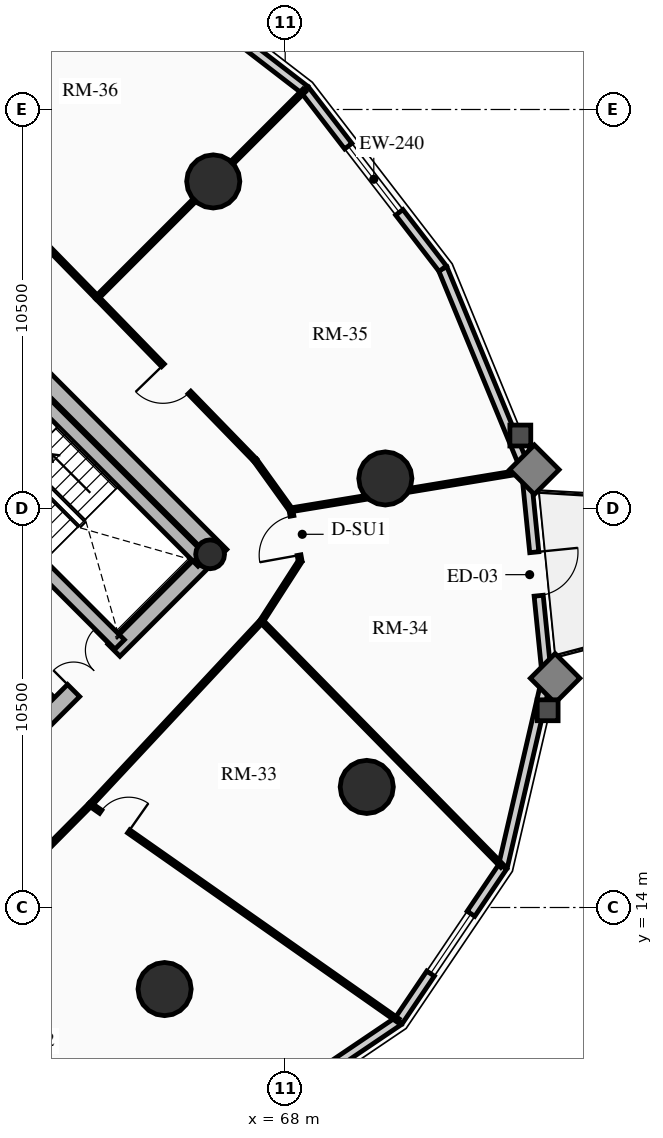
"""IFC4 building model, lengths in metres.
Left out: names, types, materials, properties, quantities, classifications, styles, units other than length and angle.
Written with IfcOpenShell. Run it as: python <this file> out.ifc"""

import sys

from ifc_helpers import new_model, si_unit, direction, frame, frame_2d, origin, origin_2d, place, context, subcontext, project, spatial, rectangle, circle, hollow_circle, extrude, source, transform, mapped, element, fill, save


model = new_model("IFC4")
c1 = context("Model", 3, precision=1e-05, world=origin(), true_north=direction((0.0, 1.0)))
c2 = subcontext(c1, "Body", "Model", "MODEL_VIEW")
j1 = project(units=[si_unit("LENGTHUNIT", "METRE"), si_unit("PLANEANGLEUNIT", "RADIAN")], contexts=[c1])
p1 = place(None, origin())
s1 = spatial("IfcSite", under=j1, at=p1, CompositionType="ELEMENT")
p2 = place(p1, origin())
s2 = spatial("IfcBuilding", under=s1, at=p2, CompositionType="ELEMENT")
p3 = place(p2, frame((0.0, 0.0, 102.16)))
s3 = spatial("IfcBuildingStorey", under=s2, at=p3, CompositionType="ELEMENT", Elevation=102.16)
p4 = place(p3, frame((66.303, 23.263, 0.0), z_axis=(0.0, 0.0, 1.0), x_axis=(-0.707106781187, 0.707106781187, 0.0)))
e1 = element("IfcWall", 1, at=p4, inside=s3, PredefinedType="SHEAR", context=c2, shape_type="SweptSolid", body=[
    extrude(rectangle(XDim=14.2, YDim=0.45, at=frame_2d((7.1, 0.0))), origin(), (0.0, 0.0, 1.0), 2.91),
])
p5 = place(p3, frame((58.578, 15.856, 0.0), z_axis=(0.0, 0.0, 1.0), x_axis=(0.707106781187, 0.707106781187, 0.0)))
e2 = element("IfcWall", 2, at=p5, inside=s3, PredefinedType="SHEAR", context=c2, shape_type="SweptSolid", body=[
    extrude(rectangle(XDim=10.7, YDim=0.45, at=frame_2d((5.35, 0.0))), origin(), (0.0, 0.0, 1.0), 2.91),
])
m1 = source(origin(), c2, "Body", "SweptSolid", [
    extrude(rectangle(XDim=1.5, YDim=2.02, at=frame_2d((0.75, 1.01))), frame((0.0, 0.235, 0.0), z_axis=(0.0, -1.0, 0.0), x_axis=(1.0, 0.0, 0.0)), (0.0, 0.0, 1.0), 0.47),
])
p6 = place(p5, frame((5.45, 0.0, 0.0)))
e3 = element("IfcOpeningElement", 3, at=p6, cuts=e2, PredefinedType="OPENING", context=c2, shape_type="MappedRepresentation", body=[
    mapped(m1, transform((0.0, 0.0, 0.0), x_axis=(1.0, 0.0, 0.0), y_axis=(0.0, 1.0, 0.0), z_axis=(0.0, 0.0, 1.0), scale=1.0)),
])
p7 = place(p3, frame((63.645, 20.922, 0.0), z_axis=(0.0, 0.0, 1.0), x_axis=(-0.707106781187, 0.707106781187, 0.0)))
e4 = element("IfcWall", 4, at=p7, inside=s3, PredefinedType="SHEAR", context=c2, shape_type="SweptSolid", body=[
    extrude(rectangle(XDim=13.75, YDim=0.35, at=frame_2d((6.875, 0.0))), origin(), (0.0, 0.0, 1.0), 2.91),
])
m2 = source(origin(), c2, "Body", "SweptSolid", [
    extrude(rectangle(XDim=1.1, YDim=2.015, at=frame_2d((0.55, 1.007))), frame((0.0, 0.185, 0.0), z_axis=(0.0, -1.0, 0.0), x_axis=(1.0, 0.0, 0.0)), (0.0, 0.0, 1.0), 0.37),
])
p8 = place(p7, frame((10.0, 0.0, 0.0)))
e5 = element("IfcOpeningElement", 5, at=p8, cuts=e4, PredefinedType="OPENING", context=c2, shape_type="MappedRepresentation", body=[
    mapped(m2, transform((0.0, 0.0, 0.0), x_axis=(1.0, 0.0, 0.0), y_axis=(0.0, 1.0, 0.0), z_axis=(0.0, 0.0, 1.0), scale=1.0)),
])
p9 = place(p7, frame((12.0, 0.0, 0.0)))
e6 = element("IfcOpeningElement", 6, at=p9, cuts=e4, PredefinedType="OPENING", context=c2, shape_type="MappedRepresentation", body=[
    mapped(m2, transform((0.0, 0.0, 0.0), x_axis=(1.0, 0.0, 0.0), y_axis=(0.0, 1.0, 0.0), z_axis=(0.0, 0.0, 1.0), scale=1.0)),
])
m3 = source(origin(), c2, "Body", "SweptSolid", [
    extrude(rectangle(XDim=1.15, YDim=2.02, at=frame_2d((0.575, 1.01))), frame((0.0, 0.185, 0.0), z_axis=(0.0, -1.0, 0.0), x_axis=(1.0, 0.0, 0.0)), (0.0, 0.0, 1.0), 0.37),
])
p10 = place(p7, frame((5.305, 0.0, 0.0)))
e7 = element("IfcOpeningElement", 7, at=p10, cuts=e4, PredefinedType="OPENING", context=c2, shape_type="MappedRepresentation", body=[
    mapped(m3, transform((0.0, 0.0, 0.0), x_axis=(1.0, 0.0, 0.0), y_axis=(0.0, 1.0, 0.0), z_axis=(0.0, 0.0, 1.0), scale=1.0)),
])
p11 = place(p3, frame((65.83, 23.107, 0.0), z_axis=(0.0, 0.0, 1.0), x_axis=(-0.707088616009, 0.707124945897, 0.0)))
e8 = element("IfcWall", 8, at=p11, inside=s3, PredefinedType="SHEAR", context=c2, shape_type="SweptSolid", body=[
    extrude(rectangle(XDim=6.72, YDim=0.35, at=frame_2d((3.36, 0.0))), origin(), (0.0, 0.0, 1.0), 2.91),
])
p12 = place(p3, frame((66.024, 23.294, 0.0), z_axis=(0.0, 0.0, 1.0), x_axis=(0.707106781187, 0.707106781187, 0.0)))
e9 = element("IfcColumn", 9, at=p12, inside=s3, PredefinedType="COLUMN", context=c2, shape_type="SweptSolid", body=[
    extrude(hollow_circle(Radius=0.38, WallThickness=0.032, at=origin_2d()), origin(), (0.0, 0.0, 1.0), 2.91),
])
for number, where, z_axis, x_axis in (
    (10, (66.107, 33.107, 0.0), (0.0, 0.0, 1.0), (1.0, 0.0, 0.0)),
    (11, (64.827, 11.854, 0.0), (0.0, 0.0, 1.0), (1.0, 0.0, 0.0)),
    (12, (70.146, 17.173, 0.0), (0.0, 0.0, 1.0), (1.0, 0.0, 0.0)),
    (13, (70.635, 25.291, 0.0), (0.0, 0.0, 1.0), (1.0, 0.0, 0.0)),
):
    element("IfcColumn", number, at=place(p3, frame(where, z_axis=z_axis, x_axis=x_axis)), inside=s3, PredefinedType="USERDEFINED", context=c2, shape_type="SweptSolid", body=[
        extrude(circle(Radius=0.7, at=origin_2d()), origin(), (0.0, 0.0, 1.0), 2.91),
    ])
p13 = place(p3, frame((63.811, 39.145, 0.0), z_axis=(0.0, 0.0, 1.0), x_axis=(0.791982052206, -0.61054437102, 0.0)))
e14 = element("IfcWall", 14, at=p13, inside=s3, PredefinedType="SOLIDWALL", context=c2, shape_type="SweptSolid", body=[
    extrude(rectangle(XDim=5.942, YDim=0.24, at=frame_2d((2.971, 0.0))), origin(), (0.0, 0.0, 1.0), 2.179),
])
p14 = place(p3, frame((70.985, 11.015, 0.0), z_axis=(0.0, 0.0, 1.0), x_axis=(-0.828781148131, -0.559572880421, 0.0)))
e15 = element("IfcWall", 15, at=p14, inside=s3, PredefinedType="SOLIDWALL", context=c2, shape_type="SweptSolid", body=[
    extrude(rectangle(XDim=4.905, YDim=0.24, at=frame_2d((2.452, 0.0))), origin(), (0.0, 0.0, 1.0), 2.179),
])
p15 = place(p3, frame((73.729, 15.08, 0.0), z_axis=(0.0, 0.0, 1.0), x_axis=(-0.559572880421, -0.828781148131, 0.0)))
e16 = element("IfcWall", 16, at=p15, inside=s3, PredefinedType="SOLIDWALL", context=c2, shape_type="SweptSolid", body=[
    extrude(rectangle(XDim=4.905, YDim=0.24, at=frame_2d((2.452, 0.0))), origin(), (0.0, 0.0, 1.0), 2.179),
])
m4 = source(origin(), c2, "Body", "SweptSolid", [
    extrude(rectangle(XDim=1.9, YDim=1.35, at=frame_2d((0.95, 0.675))), frame((0.0, 0.13, 0.0), z_axis=(0.0, -1.0, 0.0), x_axis=(1.0, 0.0, 0.0)), (0.0, 0.0, 1.0), 0.26),
])
p16 = place(p15, frame((1.502, 0.0, 0.65)))
e17 = element("IfcOpeningElement", 17, at=p16, cuts=e16, PredefinedType="OPENING", context=c2, shape_type="MappedRepresentation", body=[
    mapped(m4, transform((0.0, 0.0, 0.0), x_axis=(1.0, 0.0, 0.0), y_axis=(0.0, 1.0, 0.0), z_axis=(0.0, 0.0, 1.0), scale=1.0)),
])
p17 = place(p3, frame((74.885, 20.067, 0.0), z_axis=(0.0, 0.0, 1.0), x_axis=(-0.225834725257, -0.974165631126, 0.0)))
e18 = element("IfcWall", 18, at=p17, inside=s3, PredefinedType="SOLIDWALL", context=c2, shape_type="SweptSolid", body=[
    extrude(rectangle(XDim=5.119, YDim=0.24, at=frame_2d((2.56, 0.0))), origin(), (0.0, 0.0, 1.0), 2.179),
])
p18 = place(p3, frame((74.339, 25.487, 0.0), z_axis=(0.0, 0.0, 1.0), x_axis=(0.10015591906, -0.994971754311, 0.0)))
e19 = element("IfcWall", 19, at=p18, inside=s3, PredefinedType="SOLIDWALL", context=c2, shape_type="SweptSolid", body=[
    extrude(rectangle(XDim=5.448, YDim=0.24, at=frame_2d((2.724, 0.0))), origin(), (0.0, 0.0, 1.0), 2.179),
])
m5 = source(origin(), c2, "Body", "SweptSolid", [
    extrude(rectangle(XDim=1.15, YDim=2.005, at=frame_2d((0.575, 1.002))), frame((0.0, 0.13, 0.0), z_axis=(0.0, -1.0, 0.0), x_axis=(1.0, 0.0, 0.0)), (0.0, 0.0, 1.0), 0.26),
])
p19 = place(p18, frame((2.149, 0.0, 0.0)))
e20 = element("IfcOpeningElement", 20, at=p19, cuts=e19, PredefinedType="OPENING", context=c2, shape_type="MappedRepresentation", body=[
    mapped(m5, transform((0.0, 0.0, 0.0), x_axis=(1.0, 0.0, 0.0), y_axis=(0.0, 1.0, 0.0), z_axis=(0.0, 0.0, 1.0), scale=1.0)),
])
p20 = place(p3, frame((72.145, 30.811, 0.0), z_axis=(0.0, 0.0, 1.0), x_axis=(0.381027003055, -0.924563909604, 0.0)))
e21 = element("IfcWall", 21, at=p20, inside=s3, PredefinedType="SOLIDWALL", context=c2, shape_type="SweptSolid", body=[
    extrude(rectangle(XDim=5.758, YDim=0.24, at=frame_2d((2.879, 0.0))), origin(), (0.0, 0.0, 1.0), 2.179),
])
p21 = place(p3, frame((68.517, 35.517, 0.0), z_axis=(0.0, 0.0, 1.0), x_axis=(0.61054437102, -0.791982052206, 0.0)))
e22 = element("IfcWall", 22, at=p21, inside=s3, PredefinedType="SOLIDWALL", context=c2, shape_type="SweptSolid", body=[
    extrude(rectangle(XDim=5.942, YDim=0.24, at=frame_2d((2.971, 0.0))), origin(), (0.0, 0.0, 1.0), 2.179),
])
m6 = source(origin(), c2, "Body", "SweptSolid", [
    extrude(rectangle(XDim=2.2, YDim=1.35, at=frame_2d((1.1, 0.675))), frame((0.0, 0.13, 0.0), z_axis=(0.0, -1.0, 0.0), x_axis=(1.0, 0.0, 0.0)), (0.0, 0.0, 1.0), 0.26),
])
p22 = place(p21, frame((1.871, 0.0, 0.65)))
e23 = element("IfcOpeningElement", 23, at=p22, cuts=e22, PredefinedType="OPENING", context=c2, shape_type="MappedRepresentation", body=[
    mapped(m6, transform((0.0, 0.0, 0.0), x_axis=(1.0, 0.0, 0.0), y_axis=(0.0, 1.0, 0.0), z_axis=(0.0, 0.0, 1.0), scale=1.0)),
])
p23 = place(p3, frame((61.835, 19.529, 0.0), z_axis=(0.0, 0.0, 1.0), x_axis=(-0.707146413884, 0.707067146267, 0.0)))
e24 = element("IfcWall", 24, at=p23, inside=s3, PredefinedType="PARTITIONING", context=c2, shape_type="SweptSolid", body=[
    extrude(rectangle(XDim=3.08, YDim=0.125, at=frame_2d((1.54, 0.0))), origin(), (0.0, 0.0, 1.0), 2.655),
])
m7 = source(origin(), c2, "Body", "SweptSolid", [
    extrude(rectangle(XDim=0.9, YDim=2.005, at=frame_2d((0.45, 1.002))), frame((0.0, 0.073, 0.0), z_axis=(0.0, -1.0, 0.0), x_axis=(1.0, 0.0, 0.0)), (0.0, 0.0, 1.0), 0.145),
])
p24 = place(p23, frame((1.05, 0.0, 0.0)))
e25 = element("IfcOpeningElement", 25, at=p24, cuts=e24, PredefinedType="OPENING", context=c2, shape_type="MappedRepresentation", body=[
    mapped(m7, transform((0.0, 0.0, 0.0), x_axis=(1.0, 0.0, 0.0), y_axis=(0.0, 1.0, 0.0), z_axis=(0.0, 0.0, 1.0), scale=1.0)),
])
p25 = place(p3, frame((63.051, 30.051, 0.0), z_axis=(0.0, 0.0, 1.0), x_axis=(-0.698911483116, 0.715208178622, 0.0)))
e26 = element("IfcWall", 26, at=p25, inside=s3, PredefinedType="MOVABLE", context=c2, shape_type="SweptSolid", body=[
    extrude(rectangle(XDim=6.082, YDim=0.1, at=frame_2d((3.041, 0.0))), origin(), (0.0, 0.0, 1.0), 2.225),
])
p26 = place(p3, frame((60.549, 14.366, 0.0), z_axis=(0.0, 0.0, 1.0), x_axis=(0.704402344516, 0.709800913666, 0.0)))
e27 = element("IfcWall", 27, at=p26, inside=s3, PredefinedType="MOVABLE", context=c2, shape_type="SweptSolid", body=[
    extrude(rectangle(XDim=3.301, YDim=0.1, at=frame_2d((1.651, 0.0))), origin(), (0.0, 0.0, 1.0), 2.225),
])
p27 = place(p3, frame((62.875, 16.709, 0.0), z_axis=(0.0, 0.0, 1.0), x_axis=(0.682290572861, 0.731081099595, 0.0)))
e28 = element("IfcWall", 28, at=p27, inside=s3, PredefinedType="MOVABLE", context=c2, shape_type="SweptSolid", body=[
    extrude(rectangle(XDim=6.6, YDim=0.1, at=frame_2d((3.3, 0.0))), origin(), (0.0, 0.0, 1.0), 2.225),
])
p28 = place(p3, frame((67.378, 21.534, 0.0), z_axis=(0.0, 0.0, 1.0), x_axis=(0.54130306552, 0.840827563332, 0.0)))
e29 = element("IfcWall", 29, at=p28, inside=s3, PredefinedType="MOVABLE", context=c2, shape_type="SweptSolid", body=[
    extrude(rectangle(XDim=1.877, YDim=0.1, at=frame_2d((0.938, 0.0))), origin(), (0.0, 0.0, 1.0), 2.225),
])
p29 = place(p3, frame((68.394, 23.113, 0.0), z_axis=(0.0, 0.0, 1.0), x_axis=(-0.177868948753, 0.984054184011, 0.0)))
e30 = element("IfcWall", 30, at=p29, inside=s3, PredefinedType="MOVABLE", context=c2, shape_type="SweptSolid", body=[
    extrude(rectangle(XDim=1.374, YDim=0.1, at=frame_2d((0.687, 0.0))), origin(), (0.0, 0.0, 1.0), 2.225),
])
m8 = source(origin(), c2, "Body", "SweptSolid", [
    extrude(rectangle(XDim=1.05, YDim=2.015, at=frame_2d((0.525, 1.007))), frame((0.0, 0.06, 0.0), z_axis=(0.0, -1.0, 0.0), x_axis=(1.0, 0.0, 0.0)), (0.0, 0.0, 1.0), 0.12),
])
p30 = place(p29, frame((0.162, 0.0, 0.0)))
e31 = element("IfcOpeningElement", 31, at=p30, cuts=e30, PredefinedType="OPENING", context=c2, shape_type="MappedRepresentation", body=[
    mapped(m8, transform((0.0, 0.0, 0.0), x_axis=(1.0, 0.0, 0.0), y_axis=(0.0, 1.0, 0.0), z_axis=(0.0, 0.0, 1.0), scale=1.0)),
])
p31 = place(p3, frame((68.15, 24.465, 0.0), z_axis=(0.0, 0.0, 1.0), x_axis=(-0.58376767291, 0.811920749868, 0.0)))
e32 = element("IfcWall", 32, at=p31, inside=s3, PredefinedType="MOVABLE", context=c2, shape_type="SweptSolid", body=[
    extrude(rectangle(XDim=1.605, YDim=0.1, at=frame_2d((0.803, 0.0))), origin(), (0.0, 0.0, 1.0), 2.225),
])
p32 = place(p3, frame((67.213, 25.768, 0.0), z_axis=(0.0, 0.0, 1.0), x_axis=(-0.696916079748, 0.717152687918, 0.0)))
e33 = element("IfcWall", 33, at=p32, inside=s3, PredefinedType="MOVABLE", context=c2, shape_type="SweptSolid", body=[
    extrude(rectangle(XDim=5.972, YDim=0.1, at=frame_2d((2.986, 0.0))), origin(), (0.0, 0.0, 1.0), 2.655),
])
m9 = source(origin(), c2, "Body", "SweptSolid", [
    extrude(rectangle(XDim=1.0, YDim=2.015, at=frame_2d((0.5, 1.007))), frame((0.0, 0.06, 0.0), z_axis=(0.0, -1.0, 0.0), x_axis=(1.0, 0.0, 0.0)), (0.0, 0.0, 1.0), 0.12),
])
p33 = place(p32, frame((2.486, 0.0, 0.0)))
e34 = element("IfcOpeningElement", 34, at=p33, cuts=e33, PredefinedType="OPENING", context=c2, shape_type="MappedRepresentation", body=[
    mapped(m9, transform((0.0, 0.0, 0.0), x_axis=(1.0, 0.0, 0.0), y_axis=(0.0, 1.0, 0.0), z_axis=(0.0, 0.0, 1.0), scale=1.0)),
])
p34 = place(p3, frame((63.051, 30.051, 0.0), z_axis=(0.0, 0.0, 1.0), x_axis=(0.707106781187, 0.707106781187, 0.0)))
e35 = element("IfcWall", 35, at=p34, inside=s3, PredefinedType="MOVABLE", context=c2, shape_type="SweptSolid", body=[
    extrude(rectangle(XDim=7.711, YDim=0.1, at=frame_2d((3.855, 0.0))), origin(), (0.0, 0.0, 1.0), 2.179),
])
p35 = place(p3, frame((67.378, 21.534, 0.0), z_axis=(0.0, 0.0, 1.0), x_axis=(0.700878918497, -0.713280268622, 0.0)))
e36 = element("IfcWall", 36, at=p35, inside=s3, PredefinedType="MOVABLE", context=c2, shape_type="SweptSolid", body=[
    extrude(rectangle(XDim=9.036, YDim=0.1, at=frame_2d((4.518, 0.0))), origin(), (0.0, 0.0, 1.0), 2.179),
])
p36 = place(p3, frame((68.15, 24.465, 0.0), z_axis=(0.0, 0.0, 1.0), x_axis=(0.986627164528, 0.162993368625, 0.0)))
e37 = element("IfcWall", 37, at=p36, inside=s3, PredefinedType="MOVABLE", context=c2, shape_type="SweptSolid", body=[
    extrude(rectangle(XDim=6.254, YDim=0.1, at=frame_2d((3.127, 0.0))), origin(), (0.0, 0.0, 1.0), 2.179),
])
p37 = place(p3, frame((62.875, 16.709, 0.0), z_axis=(0.0, 0.0, 1.0), x_axis=(0.818628370173, -0.574323594804, 0.0)))
e38 = element("IfcWall", 38, at=p37, inside=s3, PredefinedType="MOVABLE", context=c2, shape_type="SweptSolid", body=[
    extrude(rectangle(XDim=9.889, YDim=0.1, at=frame_2d((4.945, 0.0))), origin(), (0.0, 0.0, 1.0), 2.179),
])
m10 = source(origin(), c2, "Body", "SweptSolid", [
    extrude(rectangle(XDim=0.9, YDim=2.005, at=frame_2d((0.45, 1.002))), frame((0.0, 0.06, 0.0), z_axis=(0.0, -1.0, 0.0), x_axis=(1.0, 0.0, 0.0)), (0.0, 0.0, 1.0), 0.12),
])
p38 = place(p37, frame((0.33, 0.0, 0.0)))
e39 = element("IfcOpeningElement", 39, at=p38, cuts=e38, PredefinedType="OPENING", context=c2, shape_type="MappedRepresentation", body=[
    mapped(m10, transform((0.0, 0.0, 0.0), x_axis=(1.0, 0.0, 0.0), y_axis=(0.0, 1.0, 0.0), z_axis=(0.0, 0.0, 1.0), scale=1.0)),
])
m11 = source(origin(), c2, "Body", "SweptSolid", [
    extrude(rectangle(XDim=1.9, YDim=1.35, at=frame_2d((0.95, 0.675))), frame((0.0, 0.03, 0.0), z_axis=(0.0, -1.0, 0.0), x_axis=(1.0, 0.0, 0.0)), (0.0, 0.0, 1.0), 0.06),
])
p39 = place(p16, origin())
e40 = element("IfcWindow", 40, at=p39, inside=s3, PartitioningType="DOUBLE_PANEL_VERTICAL", PredefinedType="WINDOW", context=c2, shape_type="MappedRepresentation", body=[
    mapped(m11, transform((0.0, 0.0, 0.0), x_axis=(1.0, 0.0, 0.0), y_axis=(0.0, 1.0, 0.0), z_axis=(0.0, 0.0, 1.0), scale=1.0)),
])
fill(e17, e40)
m12 = source(origin(), c2, "Body", "SweptSolid", [
    extrude(rectangle(XDim=1.15, YDim=2.005, at=frame_2d((0.575, 1.002))), frame((0.0, 0.025, 0.0), z_axis=(0.0, -1.0, 0.0), x_axis=(1.0, 0.0, 0.0)), (0.0, 0.0, 1.0), 0.05),
])
p40 = place(p19, origin())
e41 = element("IfcDoor", 41, at=p40, inside=s3, OperationType="SINGLE_SWING_LEFT", PredefinedType="DOOR", context=c2, shape_type="MappedRepresentation", body=[
    mapped(m12, transform((0.0, 0.0, 0.0), x_axis=(1.0, 0.0, 0.0), y_axis=(0.0, 1.0, 0.0), z_axis=(0.0, 0.0, 1.0), scale=1.0)),
])
fill(e20, e41)
m13 = source(origin(), c2, "Body", "SweptSolid", [
    extrude(rectangle(XDim=2.2, YDim=1.35, at=frame_2d((1.1, 0.675))), frame((0.0, 0.03, 0.0), z_axis=(0.0, -1.0, 0.0), x_axis=(1.0, 0.0, 0.0)), (0.0, 0.0, 1.0), 0.06),
])
p41 = place(p22, origin())
e42 = element("IfcWindow", 42, at=p41, inside=s3, PartitioningType="DOUBLE_PANEL_VERTICAL", PredefinedType="WINDOW", context=c2, shape_type="MappedRepresentation", body=[
    mapped(m13, transform((0.0, 0.0, 0.0), x_axis=(1.0, 0.0, 0.0), y_axis=(0.0, 1.0, 0.0), z_axis=(0.0, 0.0, 1.0), scale=1.0)),
])
fill(e23, e42)
m14 = source(origin(), c2, "Body", "SweptSolid", [
    extrude(rectangle(XDim=1.5, YDim=2.02, at=frame_2d((0.75, 1.01))), frame((0.0, 0.025, 0.0), z_axis=(0.0, -1.0, 0.0), x_axis=(1.0, 0.0, 0.0)), (0.0, 0.0, 1.0), 0.05),
])
p42 = place(p6, origin())
e43 = element("IfcDoor", 43, at=p42, inside=s3, OperationType="DOUBLE_DOOR_SINGLE_SWING", PredefinedType="DOOR", context=c2, shape_type="MappedRepresentation", body=[
    mapped(m14, transform((0.0, 0.0, 0.0), x_axis=(1.0, 0.0, 0.0), y_axis=(0.0, 1.0, 0.0), z_axis=(0.0, 0.0, 1.0), scale=1.0)),
])
fill(e3, e43)
m15 = source(origin(), c2, "Body", "SweptSolid", [
    extrude(rectangle(XDim=0.9, YDim=2.005, at=frame_2d((0.45, 1.002))), frame((0.0, 0.025, 0.0), z_axis=(0.0, -1.0, 0.0), x_axis=(1.0, 0.0, 0.0)), (0.0, 0.0, 1.0), 0.05),
])
p43 = place(p38, origin())
e44 = element("IfcDoor", 44, at=p43, inside=s3, OperationType="SINGLE_SWING_RIGHT", PredefinedType="DOOR", context=c2, shape_type="MappedRepresentation", body=[
    mapped(m15, transform((0.0, 0.0, 0.0), x_axis=(1.0, 0.0, 0.0), y_axis=(0.0, 1.0, 0.0), z_axis=(0.0, 0.0, 1.0), scale=1.0)),
])
fill(e39, e44)
m16 = source(origin(), c2, "Body", "SweptSolid", [
    extrude(rectangle(XDim=1.05, YDim=2.015, at=frame_2d((0.525, 1.007))), frame((0.0, 0.025, 0.0), z_axis=(0.0, -1.0, 0.0), x_axis=(1.0, 0.0, 0.0)), (0.0, 0.0, 1.0), 0.05),
])
p44 = place(p30, origin())
e45 = element("IfcDoor", 45, at=p44, inside=s3, OperationType="SINGLE_SWING_LEFT", PredefinedType="DOOR", context=c2, shape_type="MappedRepresentation", body=[
    mapped(m16, transform((0.0, 0.0, 0.0), x_axis=(1.0, 0.0, 0.0), y_axis=(0.0, 1.0, 0.0), z_axis=(0.0, 0.0, 1.0), scale=1.0)),
])
fill(e31, e45)
m17 = source(origin(), c2, "Body", "SweptSolid", [
    extrude(rectangle(XDim=1.0, YDim=2.015, at=frame_2d((0.5, 1.007))), frame((0.0, 0.025, 0.0), z_axis=(0.0, -1.0, 0.0), x_axis=(1.0, 0.0, 0.0)), (0.0, 0.0, 1.0), 0.05),
])
p45 = place(p33, origin())
e46 = element("IfcDoor", 46, at=p45, inside=s3, OperationType="SINGLE_SWING_RIGHT", PredefinedType="DOOR", context=c2, shape_type="MappedRepresentation", body=[
    mapped(m17, transform((0.0, 0.0, 0.0), x_axis=(1.0, 0.0, 0.0), y_axis=(0.0, 1.0, 0.0), z_axis=(0.0, 0.0, 1.0), scale=1.0)),
])
fill(e34, e46)
save(model, sys.argv[1])
